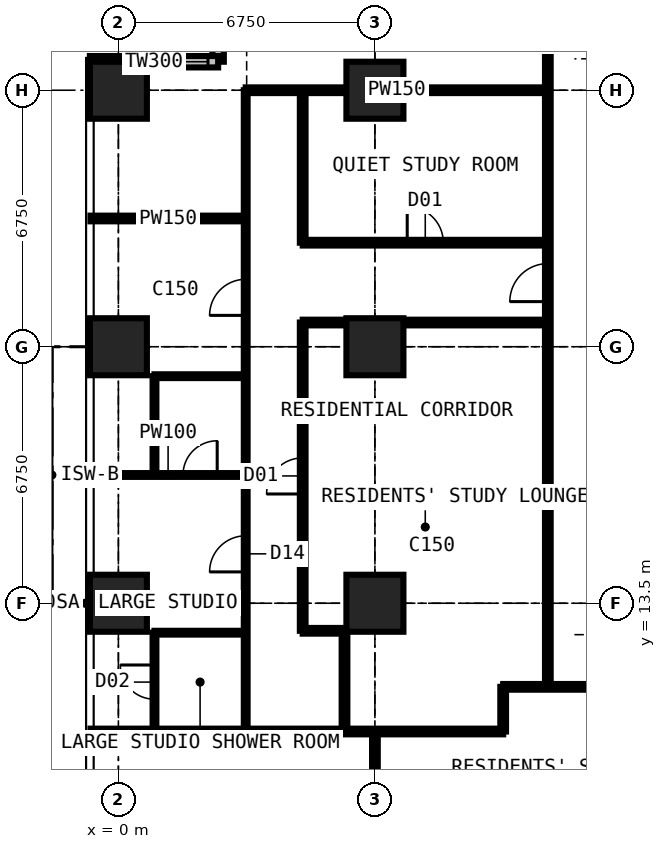
"""IFC4 building model, lengths in metres.
Left out: names, types, materials, properties, quantities, classifications, styles, units other than length and angle.
Written with IfcOpenShell. Run it as: python <this file> out.ifc"""

import sys

from ifc_helpers import new_model, si_unit, direction, frame, frame_2d, origin, origin_2d, place, context, subcontext, project, spatial, rectangle, extrude, element, fill, save


model = new_model("IFC4")
c1 = context("Model", 3, precision=1e-05, world=origin(), true_north=direction((0.0, 1.0)))
c2 = subcontext(c1, "Body", "Model", "MODEL_VIEW")
j1 = project(units=[si_unit("LENGTHUNIT", "METRE"), si_unit("PLANEANGLEUNIT", "RADIAN")], contexts=[c1])
p1 = place(None, origin())
s1 = spatial("IfcSite", under=j1, at=p1, CompositionType="ELEMENT")
p2 = place(p1, origin())
s2 = spatial("IfcBuilding", under=s1, at=p2, CompositionType="ELEMENT")
p3 = place(p2, frame((0.0, 0.0, 119.7)))
s3 = spatial("IfcBuildingStorey", under=s2, at=p3, CompositionType="ELEMENT", Elevation=119.7)
for number, where, z_axis, x_axis in (
    (1, (0.0, 13.5, 0.0), (0.0, 0.0, 1.0), (1.0, 0.0, 0.0)),
    (2, (0.0, 20.25, 0.0), (0.0, 0.0, 1.0), (1.0, 0.0, 0.0)),
    (3, (0.0, 27.0, 0.0), (0.0, 0.0, 1.0), (1.0, 0.0, 0.0)),
    (4, (6.75, 13.5, 0.0), (0.0, 0.0, 1.0), (1.0, 0.0, 0.0)),
    (5, (6.75, 20.25, 0.0), (0.0, 0.0, 1.0), (1.0, 0.0, 0.0)),
    (6, (6.75, 27.0, 0.0), (0.0, 0.0, 1.0), (1.0, 0.0, 0.0)),
):
    element("IfcColumn", number, at=place(p3, frame(where, z_axis=z_axis, x_axis=x_axis)), inside=s3, PredefinedType="COLUMN", context=c2, shape_type="SweptSolid", body=[
        extrude(rectangle(XDim=1.5, YDim=1.5, at=origin_2d()), origin(), (0.0, 0.0, 1.0), 3.6),
    ])
p4 = place(p3, frame((2.625, 31.125, 0.0), z_axis=(0.0, 0.0, 1.0), x_axis=(0.0, -1.0, 0.0)))
e7 = element("IfcWall", 7, at=p4, inside=s3, PredefinedType="SOLIDWALL", context=c2, shape_type="SweptSolid", body=[
    extrude(rectangle(XDim=3.375, YDim=0.3, at=frame_2d((1.688, 0.0))), origin(), (0.0, 0.0, 1.0), 3.375),
])
p5 = place(p4, frame((0.788, 0.0, 0.6)))
e8 = element("IfcOpeningElement", 8, at=p5, cuts=e7, PredefinedType="OPENING", context=c2, shape_type="SweptSolid", body=[
    extrude(rectangle(XDim=1.8, YDim=2.1, at=frame_2d((0.9, 1.05))), frame((0.0, 0.16, 0.0), z_axis=(0.0, -1.0, 0.0), x_axis=(1.0, 0.0, 0.0)), (0.0, 0.0, 1.0), 0.32),
])
p6 = place(p3, frame((2.625, 27.75, 0.0), z_axis=(0.0, 0.0, 1.0), x_axis=(-1.0, 0.0, 0.0)))
e9 = element("IfcWall", 9, at=p6, inside=s3, PredefinedType="SOLIDWALL", context=c2, shape_type="SweptSolid", body=[
    extrude(rectangle(XDim=3.375, YDim=0.3, at=frame_2d((1.688, 0.0))), origin(), (0.0, 0.0, 1.0), 3.375),
])
p7 = place(p6, frame((0.268, 0.0, 0.9)))
e10 = element("IfcOpeningElement", 10, at=p7, cuts=e9, PredefinedType="OPENING", context=c2, shape_type="SweptSolid", body=[
    extrude(rectangle(XDim=1.5, YDim=1.8, at=frame_2d((0.75, 0.9))), frame((0.0, 0.16, 0.0), z_axis=(0.0, -1.0, 0.0), x_axis=(1.0, 0.0, 0.0)), (0.0, 0.0, 1.0), 0.32),
])
p8 = place(p3, frame((-0.734, 10.125, 0.0), z_axis=(0.0, 0.0, 1.0), x_axis=(1.0, 0.0, 0.0)))
e11 = element("IfcWall", 11, at=p8, inside=s3, PredefinedType="PARTITIONING", context=c2, shape_type="SweptSolid", body=[
    extrude(rectangle(XDim=10.859, YDim=0.15, at=frame_2d((5.429, 0.0))), origin(), (0.0, 0.0, 1.0), 3.375),
])
p9 = place(p3, frame((-0.734, 16.875, 0.0), z_axis=(0.0, 0.0, 1.0), x_axis=(1.0, 0.0, 0.0)))
e12 = element("IfcWall", 12, at=p9, inside=s3, PredefinedType="PARTITIONING", context=c2, shape_type="SweptSolid", body=[
    extrude(rectangle(XDim=4.084, YDim=0.1, at=frame_2d((2.042, 0.0))), origin(), (0.0, 0.0, 1.0), 3.375),
])
p10 = place(p9, frame((2.434, 0.0, 0.0)))
e13 = element("IfcOpeningElement", 13, at=p10, cuts=e12, PredefinedType="OPENING", context=c2, shape_type="SweptSolid", body=[
    extrude(rectangle(XDim=0.9, YDim=2.2, at=frame_2d((0.45, 1.1))), frame((0.0, 0.06, 0.0), z_axis=(0.0, -1.0, 0.0), x_axis=(1.0, 0.0, 0.0)), (0.0, 0.0, 1.0), 0.12),
])
p11 = place(p3, frame((-0.734, 23.625, 0.0), z_axis=(0.0, 0.0, 1.0), x_axis=(1.0, 0.0, 0.0)))
e14 = element("IfcWall", 14, at=p11, inside=s3, PredefinedType="PARTITIONING", context=c2, shape_type="SweptSolid", body=[
    extrude(rectangle(XDim=4.084, YDim=0.15, at=frame_2d((2.042, 0.0))), origin(), (0.0, 0.0, 1.0), 3.375),
])
p12 = place(p3, frame((0.95, 10.125, 0.0), z_axis=(0.0, 0.0, 1.0), x_axis=(0.0, 1.0, 0.0)))
e15 = element("IfcWall", 15, at=p12, inside=s3, PredefinedType="PARTITIONING", context=c2, shape_type="SweptSolid", body=[
    extrude(rectangle(XDim=2.6, YDim=0.1, at=frame_2d((1.3, 0.0))), origin(), (0.0, 0.0, 1.0), 3.375),
])
p13 = place(p12, frame((0.85, 0.0, 0.0)))
e16 = element("IfcOpeningElement", 16, at=p13, cuts=e15, PredefinedType="OPENING", context=c2, shape_type="SweptSolid", body=[
    extrude(rectangle(XDim=0.9, YDim=2.2, at=frame_2d((0.45, 1.1))), frame((0.0, 0.06, 0.0), z_axis=(0.0, -1.0, 0.0), x_axis=(1.0, 0.0, 0.0)), (0.0, 0.0, 1.0), 0.12),
])
p14 = place(p3, frame((0.95, 12.725, 0.0), z_axis=(0.0, 0.0, 1.0), x_axis=(1.0, 0.0, 0.0)))
e17 = element("IfcWall", 17, at=p14, inside=s3, PredefinedType="PARTITIONING", context=c2, shape_type="SweptSolid", body=[
    extrude(rectangle(XDim=2.4, YDim=0.1, at=frame_2d((1.2, 0.0))), origin(), (0.0, 0.0, 1.0), 3.375),
])
p15 = place(p3, frame((0.95, 16.875, 0.0), z_axis=(0.0, 0.0, 1.0), x_axis=(0.0, 1.0, 0.0)))
e18 = element("IfcWall", 18, at=p15, inside=s3, PredefinedType="PARTITIONING", context=c2, shape_type="SweptSolid", body=[
    extrude(rectangle(XDim=2.6, YDim=0.1, at=frame_2d((1.3, 0.0))), origin(), (0.0, 0.0, 1.0), 3.375),
])
p16 = place(p3, frame((0.95, 19.475, 0.0), z_axis=(0.0, 0.0, 1.0), x_axis=(1.0, 0.0, 0.0)))
e19 = element("IfcWall", 19, at=p16, inside=s3, PredefinedType="PARTITIONING", context=c2, shape_type="SweptSolid", body=[
    extrude(rectangle(XDim=2.4, YDim=0.1, at=frame_2d((1.2, 0.0))), origin(), (0.0, 0.0, 1.0), 3.375),
])
p17 = place(p3, frame((3.35, 10.125, 0.0), z_axis=(0.0, 0.0, 1.0), x_axis=(0.0, 1.0, 0.0)))
e20 = element("IfcWall", 20, at=p17, inside=s3, PredefinedType="PARTITIONING", context=c2, shape_type="SweptSolid", body=[
    extrude(rectangle(XDim=16.875, YDim=0.1, at=frame_2d((8.438, 0.0))), origin(), (0.0, 0.0, 1.0), 3.375),
])
p18 = place(p17, frame((4.2, 0.0, 0.0)))
e21 = element("IfcOpeningElement", 21, at=p18, cuts=e20, PredefinedType="OPENING", context=c2, shape_type="SweptSolid", body=[
    extrude(rectangle(XDim=0.95, YDim=2.2, at=frame_2d((0.475, 1.1))), frame((0.0, 0.06, 0.0), z_axis=(0.0, -1.0, 0.0), x_axis=(1.0, 0.0, 0.0)), (0.0, 0.0, 1.0), 0.12),
])
p19 = place(p17, frame((10.95, 0.0, 0.0)))
e22 = element("IfcOpeningElement", 22, at=p19, cuts=e20, PredefinedType="OPENING", context=c2, shape_type="SweptSolid", body=[
    extrude(rectangle(XDim=0.95, YDim=2.2, at=frame_2d((0.475, 1.1))), frame((0.0, 0.06, 0.0), z_axis=(0.0, -1.0, 0.0), x_axis=(1.0, 0.0, 0.0)), (0.0, 0.0, 1.0), 0.12),
])
p20 = place(p3, frame((3.35, 27.0, 0.0), z_axis=(0.0, 0.0, 1.0), x_axis=(1.0, 0.0, 0.0)))
e23 = element("IfcWall", 23, at=p20, inside=s3, PredefinedType="PARTITIONING", context=c2, shape_type="SweptSolid", body=[
    extrude(rectangle(XDim=7.95, YDim=0.15, at=frame_2d((3.975, 0.0))), origin(), (0.0, 0.0, 1.0), 2.806),
])
p21 = place(p3, frame((4.85, 12.775, 0.0), z_axis=(0.0, 0.0, 1.0), x_axis=(0.0, 1.0, 0.0)))
e24 = element("IfcWall", 24, at=p21, inside=s3, PredefinedType="PARTITIONING", context=c2, shape_type="SweptSolid", body=[
    extrude(rectangle(XDim=8.113, YDim=0.15, at=frame_2d((4.056, 0.0))), origin(), (0.0, 0.0, 1.0), 3.375),
])
p22 = place(p21, frame((3.6, 0.0, 0.0)))
e25 = element("IfcOpeningElement", 25, at=p22, cuts=e24, PredefinedType="OPENING", context=c2, shape_type="SweptSolid", body=[
    extrude(rectangle(XDim=0.95, YDim=2.2, at=frame_2d((0.475, 1.1))), frame((0.0, 0.085, 0.0), z_axis=(0.0, -1.0, 0.0), x_axis=(1.0, 0.0, 0.0)), (0.0, 0.0, 1.0), 0.17),
])
p23 = place(p3, frame((4.85, 12.775, 0.0), z_axis=(0.0, 0.0, 1.0), x_axis=(1.0, 0.0, 0.0)))
e26 = element("IfcWall", 26, at=p23, inside=s3, PredefinedType="PARTITIONING", context=c2, shape_type="SweptSolid", body=[
    extrude(rectangle(XDim=1.1, YDim=0.15, at=frame_2d((0.55, 0.0))), origin(), (0.0, 0.0, 1.0), 3.375),
])
p24 = place(p3, frame((4.85, 20.887, 0.0), z_axis=(0.0, 0.0, 1.0), x_axis=(1.0, 0.0, 0.0)))
e27 = element("IfcWall", 27, at=p24, inside=s3, PredefinedType="PARTITIONING", context=c2, shape_type="SweptSolid", body=[
    extrude(rectangle(XDim=6.45, YDim=0.15, at=frame_2d((3.225, 0.0))), origin(), (0.0, 0.0, 1.0), 3.375),
])
p25 = place(p3, frame((4.85, 22.988, 0.0), z_axis=(0.0, 0.0, 1.0), x_axis=(0.0, 1.0, 0.0)))
e28 = element("IfcWall", 28, at=p25, inside=s3, PredefinedType="PARTITIONING", context=c2, shape_type="SweptSolid", body=[
    extrude(rectangle(XDim=4.012, YDim=0.15, at=frame_2d((2.006, 0.0))), origin(), (0.0, 0.0, 1.0), 3.375),
])
p26 = place(p3, frame((4.85, 22.988, 0.0), z_axis=(0.0, 0.0, 1.0), x_axis=(1.0, 0.0, 0.0)))
e29 = element("IfcWall", 29, at=p26, inside=s3, PredefinedType="PARTITIONING", context=c2, shape_type="SweptSolid", body=[
    extrude(rectangle(XDim=6.45, YDim=0.15, at=frame_2d((3.225, 0.0))), origin(), (0.0, 0.0, 1.0), 3.375),
])
p27 = place(p26, frame((2.75, 0.0, 0.0)))
e30 = element("IfcOpeningElement", 30, at=p27, cuts=e29, PredefinedType="OPENING", context=c2, shape_type="SweptSolid", body=[
    extrude(rectangle(XDim=0.95, YDim=2.2, at=frame_2d((0.475, 1.1))), frame((0.0, 0.085, 0.0), z_axis=(0.0, -1.0, 0.0), x_axis=(1.0, 0.0, 0.0)), (0.0, 0.0, 1.0), 0.17),
])
p28 = place(p3, frame((5.95, 10.125, 0.0), z_axis=(0.0, 0.0, 1.0), x_axis=(0.0, 1.0, 0.0)))
e31 = element("IfcWall", 31, at=p28, inside=s3, PredefinedType="PARTITIONING", context=c2, shape_type="SweptSolid", body=[
    extrude(rectangle(XDim=2.65, YDim=0.15, at=frame_2d((1.325, 0.0))), origin(), (0.0, 0.0, 1.0), 3.375),
])
p29 = place(p3, frame((6.75, 3.35, 0.0), z_axis=(0.0, 0.0, 1.0), x_axis=(0.0, 1.0, 0.0)))
e32 = element("IfcWall", 32, at=p29, inside=s3, PredefinedType="PARTITIONING", context=c2, shape_type="SweptSolid", body=[
    extrude(rectangle(XDim=6.775, YDim=0.15, at=frame_2d((3.387, 0.0))), origin(), (0.0, 0.0, 1.0), 2.877),
])
p30 = place(p3, frame((10.125, 10.125, 0.0), z_axis=(0.0, 0.0, 1.0), x_axis=(0.0, 1.0, 0.0)))
e33 = element("IfcWall", 33, at=p30, inside=s3, PredefinedType="PARTITIONING", context=c2, shape_type="SweptSolid", body=[
    extrude(rectangle(XDim=1.175, YDim=0.15, at=frame_2d((0.587, 0.0))), origin(), (0.0, 0.0, 1.0), 3.375),
])
p31 = place(p3, frame((10.125, 11.3, 0.0), z_axis=(0.0, 0.0, 1.0), x_axis=(1.0, 0.0, 0.0)))
e34 = element("IfcWall", 34, at=p31, inside=s3, PredefinedType="PARTITIONING", context=c2, shape_type="SweptSolid", body=[
    extrude(rectangle(XDim=20.675, YDim=0.15, at=frame_2d((10.337, 0.0))), origin(), (0.0, 0.0, 1.0), 3.375),
])
p32 = place(p31, frame((8.375, 0.0, 0.0)))
e35 = element("IfcOpeningElement", 35, at=p32, cuts=e34, PredefinedType="OPENING", context=c2, shape_type="SweptSolid", body=[
    extrude(rectangle(XDim=1.0, YDim=2.2, at=frame_2d((0.5, 1.1))), frame((0.0, 0.085, 0.0), z_axis=(0.0, -1.0, 0.0), x_axis=(1.0, 0.0, 0.0)), (0.0, 0.0, 1.0), 0.17),
])
p33 = place(p31, frame((10.975, 0.0, 0.0)))
e36 = element("IfcOpeningElement", 36, at=p33, cuts=e34, PredefinedType="OPENING", context=c2, shape_type="SweptSolid", body=[
    extrude(rectangle(XDim=1.0, YDim=2.2, at=frame_2d((0.5, 1.1))), frame((0.0, 0.085, 0.0), z_axis=(0.0, -1.0, 0.0), x_axis=(1.0, 0.0, 0.0)), (0.0, 0.0, 1.0), 0.17),
])
p34 = place(p31, frame((3.925, 0.0, 0.0)))
e37 = element("IfcOpeningElement", 37, at=p34, cuts=e34, PredefinedType="OPENING", context=c2, shape_type="SweptSolid", body=[
    extrude(rectangle(XDim=0.95, YDim=2.2, at=frame_2d((0.475, 1.1))), frame((0.0, 0.085, 0.0), z_axis=(0.0, -1.0, 0.0), x_axis=(1.0, 0.0, 0.0)), (0.0, 0.0, 1.0), 0.17),
])
p35 = place(p3, frame((11.3, 11.3, 0.0), z_axis=(0.0, 0.0, 1.0), x_axis=(0.0, 1.0, 0.0)))
e38 = element("IfcWall", 38, at=p35, inside=s3, PredefinedType="PARTITIONING", context=c2, shape_type="SweptSolid", body=[
    extrude(rectangle(XDim=19.3, YDim=0.15, at=frame_2d((9.65, 0.0))), origin(), (0.0, 0.0, 1.0), 3.375),
])
p36 = place(p35, frame((18.1, 0.0, 0.0)))
e39 = element("IfcOpeningElement", 39, at=p36, cuts=e38, PredefinedType="OPENING", context=c2, shape_type="SweptSolid", body=[
    extrude(rectangle(XDim=1.0, YDim=2.2, at=frame_2d((0.5, 1.1))), frame((0.0, 0.085, 0.0), z_axis=(0.0, -1.0, 0.0), x_axis=(1.0, 0.0, 0.0)), (0.0, 0.0, 1.0), 0.17),
])
p37 = place(p35, frame((10.137, 0.0, 0.0)))
e40 = element("IfcOpeningElement", 40, at=p37, cuts=e38, PredefinedType="OPENING", context=c2, shape_type="SweptSolid", body=[
    extrude(rectangle(XDim=1.0, YDim=2.2, at=frame_2d((0.5, 1.1))), frame((0.0, 0.085, 0.0), z_axis=(0.0, -1.0, 0.0), x_axis=(1.0, 0.0, 0.0)), (0.0, 0.0, 1.0), 0.17),
])
p38 = place(p7, origin())
e41 = element("IfcWindow", 41, at=p38, inside=s3, PartitioningType="SINGLE_PANEL", PredefinedType="WINDOW", context=c2, shape_type="SweptSolid", body=[
    extrude(rectangle(XDim=1.5, YDim=1.8, at=frame_2d((0.75, 0.9))), frame((0.0, 0.03, 0.0), z_axis=(0.0, -1.0, 0.0), x_axis=(1.0, 0.0, 0.0)), (0.0, 0.0, 1.0), 0.06),
])
fill(e10, e41)
p39 = place(p18, origin())
e42 = element("IfcDoor", 42, at=p39, inside=s3, OperationType="SINGLE_SWING_LEFT", PredefinedType="DOOR", context=c2, shape_type="SweptSolid", body=[
    extrude(rectangle(XDim=0.95, YDim=2.2, at=frame_2d((0.475, 1.1))), frame((0.0, 0.025, 0.0), z_axis=(0.0, -1.0, 0.0), x_axis=(1.0, 0.0, 0.0)), (0.0, 0.0, 1.0), 0.05),
])
fill(e21, e42)
p40 = place(p13, origin())
e43 = element("IfcDoor", 43, at=p40, inside=s3, OperationType="SINGLE_SWING_RIGHT", PredefinedType="DOOR", context=c2, shape_type="SweptSolid", body=[
    extrude(rectangle(XDim=0.9, YDim=2.2, at=frame_2d((0.45, 1.1))), frame((0.0, 0.025, 0.0), z_axis=(0.0, -1.0, 0.0), x_axis=(1.0, 0.0, 0.0)), (0.0, 0.0, 1.0), 0.05),
])
fill(e16, e43)
p41 = place(p19, origin())
e44 = element("IfcDoor", 44, at=p41, inside=s3, OperationType="SINGLE_SWING_LEFT", PredefinedType="DOOR", context=c2, shape_type="SweptSolid", body=[
    extrude(rectangle(XDim=0.95, YDim=2.2, at=frame_2d((0.475, 1.1))), frame((0.0, 0.025, 0.0), z_axis=(0.0, -1.0, 0.0), x_axis=(1.0, 0.0, 0.0)), (0.0, 0.0, 1.0), 0.05),
])
fill(e22, e44)
p42 = place(p10, origin())
e45 = element("IfcDoor", 45, at=p42, inside=s3, OperationType="SINGLE_SWING_RIGHT", PredefinedType="DOOR", context=c2, shape_type="SweptSolid", body=[
    extrude(rectangle(XDim=0.9, YDim=2.2, at=frame_2d((0.45, 1.1))), frame((0.0, 0.025, 0.0), z_axis=(0.0, -1.0, 0.0), x_axis=(1.0, 0.0, 0.0)), (0.0, 0.0, 1.0), 0.05),
])
fill(e13, e45)
p43 = place(p37, origin())
e46 = element("IfcDoor", 46, at=p43, inside=s3, OperationType="SINGLE_SWING_LEFT", PredefinedType="DOOR", context=c2, shape_type="SweptSolid", body=[
    extrude(rectangle(XDim=1.0, YDim=2.2, at=frame_2d((0.5, 1.1))), frame((0.0, 0.025, 0.0), z_axis=(0.0, -1.0, 0.0), x_axis=(1.0, 0.0, 0.0)), (0.0, 0.0, 1.0), 0.05),
])
fill(e40, e46)
p44 = place(p22, origin())
e47 = element("IfcDoor", 47, at=p44, inside=s3, OperationType="SINGLE_SWING_LEFT", PredefinedType="DOOR", context=c2, shape_type="SweptSolid", body=[
    extrude(rectangle(XDim=0.95, YDim=2.2, at=frame_2d((0.475, 1.1))), frame((0.0, 0.025, 0.0), z_axis=(0.0, -1.0, 0.0), x_axis=(1.0, 0.0, 0.0)), (0.0, 0.0, 1.0), 0.05),
])
fill(e25, e47)
p45 = place(p27, origin())
e48 = element("IfcDoor", 48, at=p45, inside=s3, OperationType="SINGLE_SWING_LEFT", PredefinedType="DOOR", context=c2, shape_type="SweptSolid", body=[
    extrude(rectangle(XDim=0.95, YDim=2.2, at=frame_2d((0.475, 1.1))), frame((0.0, 0.025, 0.0), z_axis=(0.0, -1.0, 0.0), x_axis=(1.0, 0.0, 0.0)), (0.0, 0.0, 1.0), 0.05),
])
fill(e30, e48)
save(model, sys.argv[1])
